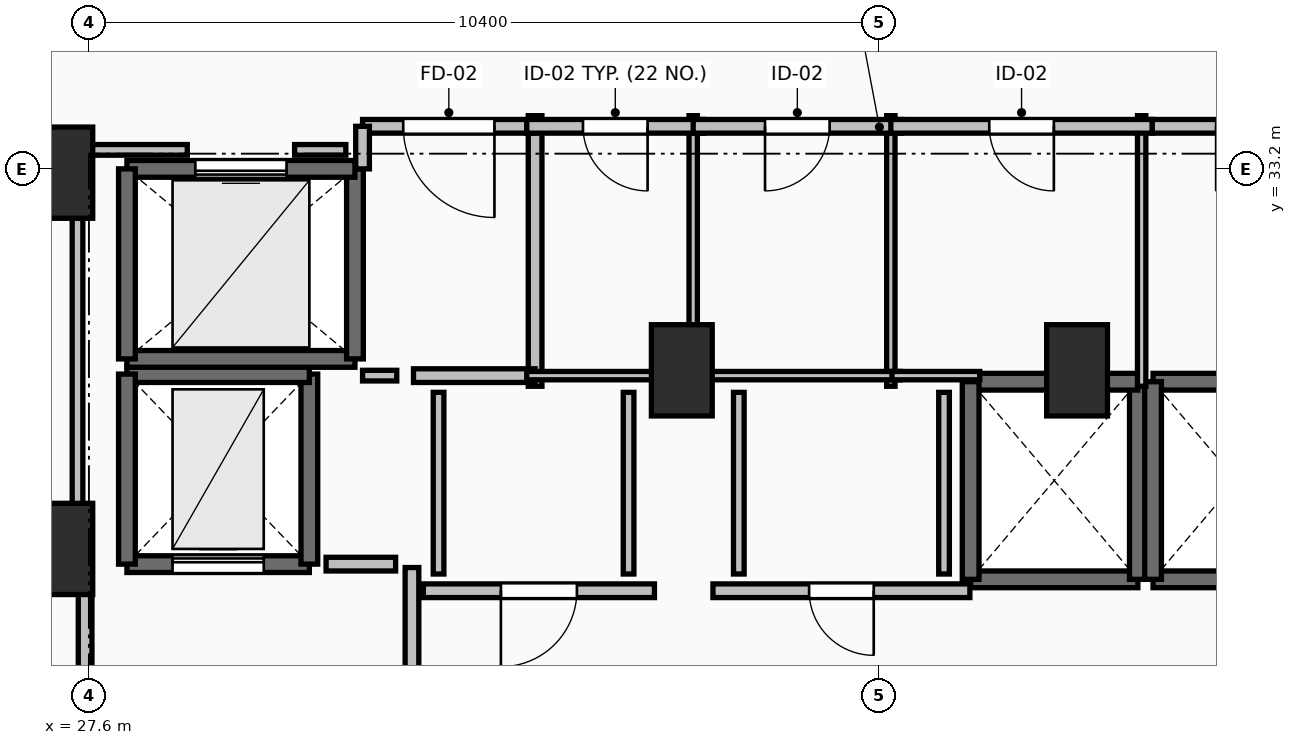
"""IFC4 building model, lengths in metres.
Left out: names, types, materials, properties, quantities, classifications, styles, units other than length and angle.
Written with IfcOpenShell. Run it as: python <this file> out.ifc"""

import sys

from ifc_helpers import new_model, si_unit, direction, frame, frame_2d, origin, origin_2d, place, context, subcontext, project, spatial, rectangle, extrude, element, fill, save


model = new_model("IFC4")
c1 = context("Model", 3, precision=1e-05, world=origin(), true_north=direction((0.0, 1.0)))
c2 = subcontext(c1, "Body", "Model", "MODEL_VIEW")
j1 = project(units=[si_unit("LENGTHUNIT", "METRE"), si_unit("PLANEANGLEUNIT", "RADIAN")], contexts=[c1])
p1 = place(None, origin())
s1 = spatial("IfcSite", under=j1, at=p1, CompositionType="ELEMENT")
p2 = place(p1, origin())
s2 = spatial("IfcBuilding", under=s1, at=p2, CompositionType="ELEMENT")
p3 = place(p2, frame((0.0, 0.0, 160.6)))
s3 = spatial("IfcBuildingStorey", under=s2, at=p3, CompositionType="ELEMENT", Elevation=160.6)
for number, where, z_axis, x_axis in (
    (1, (27.25, 28.2, 0.0), (0.0, 0.0, 1.0), (1.0, 0.0, 0.0)),
    (2, (27.25, 33.15, 0.0), (0.0, 0.0, 1.0), (1.0, 0.0, 0.0)),
    (3, (35.4, 30.55, 0.0), (0.0, 0.0, 1.0), (1.0, 0.0, 0.0)),
    (4, (40.6, 30.55, 0.0), (0.0, 0.0, 1.0), (1.0, 0.0, 0.0)),
):
    element("IfcColumn", number, at=place(p3, frame(where, z_axis=z_axis, x_axis=x_axis)), inside=s3, PredefinedType="PILASTER", context=c2, shape_type="SweptSolid", body=[
        extrude(rectangle(XDim=0.8, YDim=1.2, at=origin_2d()), origin(), (0.0, 0.0, 1.0), 3.5),
    ])
p4 = place(p3, frame((39.2, 27.8, 0.0), z_axis=(0.0, 0.0, 1.0), x_axis=(1.0, 0.0, 0.0)))
e5 = element("IfcWall", 5, at=p4, inside=s3, PredefinedType="SOLIDWALL", context=c2, shape_type="SweptSolid", body=[
    extrude(rectangle(XDim=2.2, YDim=0.22, at=frame_2d((1.1, 0.0))), origin(), (0.0, 0.0, 1.0), 3.24),
])
p5 = place(p3, frame((41.4, 27.8, 0.0), z_axis=(0.0, 0.0, 1.0), x_axis=(0.0, 1.0, 0.0)))
e6 = element("IfcWall", 6, at=p5, inside=s3, PredefinedType="SOLIDWALL", context=c2, shape_type="SweptSolid", body=[
    extrude(rectangle(XDim=2.6, YDim=0.22, at=frame_2d((1.3, 0.0))), origin(), (0.0, 0.0, 1.0), 3.24),
])
p6 = place(p3, frame((41.4, 30.4, 0.0), z_axis=(0.0, 0.0, 1.0), x_axis=(-1.0, 0.0, 0.0)))
e7 = element("IfcWall", 7, at=p6, inside=s3, PredefinedType="SOLIDWALL", context=c2, shape_type="SweptSolid", body=[
    extrude(rectangle(XDim=2.2, YDim=0.22, at=frame_2d((1.1, 0.0))), origin(), (0.0, 0.0, 1.0), 3.24),
])
p7 = place(p3, frame((39.2, 30.4, 0.0), z_axis=(0.0, 0.0, 1.0), x_axis=(0.0, -1.0, 0.0)))
e8 = element("IfcWall", 8, at=p7, inside=s3, PredefinedType="SOLIDWALL", context=c2, shape_type="SweptSolid", body=[
    extrude(rectangle(XDim=2.6, YDim=0.22, at=frame_2d((1.3, 0.0))), origin(), (0.0, 0.0, 1.0), 3.24),
])
for number, where, z_axis, x_axis in (
    (9, (41.6, 27.8, 0.0), (0.0, 0.0, 1.0), (1.0, 0.0, 0.0)),
    (10, (43.8, 30.4, 0.0), (0.0, 0.0, 1.0), (-1.0, 0.0, 0.0)),
):
    element("IfcWall", number, at=place(p3, frame(where, z_axis=z_axis, x_axis=x_axis)), inside=s3, PredefinedType="SOLIDWALL", context=c2, shape_type="SweptSolid", body=[
        extrude(rectangle(XDim=2.2, YDim=0.22, at=frame_2d((1.1, 0.0))), origin(), (0.0, 0.0, 1.0), 3.24),
    ])
p8 = place(p3, frame((41.6, 30.4, 0.0), z_axis=(0.0, 0.0, 1.0), x_axis=(0.0, -1.0, 0.0)))
e11 = element("IfcWall", 11, at=p8, inside=s3, PredefinedType="SOLIDWALL", context=c2, shape_type="SweptSolid", body=[
    extrude(rectangle(XDim=2.6, YDim=0.22, at=frame_2d((1.3, 0.0))), origin(), (0.0, 0.0, 1.0), 3.24),
])
p9 = place(p3, frame((28.1, 28.0, 0.0), z_axis=(0.0, 0.0, 1.0), x_axis=(1.0, 0.0, 0.0)))
e12 = element("IfcWall", 12, at=p9, inside=s3, PredefinedType="SHEAR", context=c2, shape_type="SweptSolid", body=[
    extrude(rectangle(XDim=2.4, YDim=0.22, at=frame_2d((1.2, 0.0))), origin(), (0.0, 0.0, 1.0), 3.24),
])
p10 = place(p9, frame((0.6, 0.0, 0.0)))
e13 = element("IfcOpeningElement", 13, at=p10, cuts=e12, PredefinedType="OPENING", context=c2, shape_type="SweptSolid", body=[
    extrude(rectangle(XDim=1.2, YDim=2.2, at=frame_2d((0.6, 1.1))), frame((0.0, 0.125, 0.0), z_axis=(0.0, -1.0, 0.0), x_axis=(1.0, 0.0, 0.0)), (0.0, 0.0, 1.0), 0.25),
])
p11 = place(p3, frame((30.5, 28.0, 0.0), z_axis=(0.0, 0.0, 1.0), x_axis=(0.0, 1.0, 0.0)))
e14 = element("IfcWall", 14, at=p11, inside=s3, PredefinedType="SHEAR", context=c2, shape_type="SweptSolid", body=[
    extrude(rectangle(XDim=2.5, YDim=0.22, at=frame_2d((1.25, 0.0))), origin(), (0.0, 0.0, 1.0), 3.24),
])
p12 = place(p3, frame((30.5, 30.5, 0.0), z_axis=(0.0, 0.0, 1.0), x_axis=(-1.0, 0.0, 0.0)))
e15 = element("IfcWall", 15, at=p12, inside=s3, PredefinedType="SHEAR", context=c2, shape_type="SweptSolid", body=[
    extrude(rectangle(XDim=2.4, YDim=0.22, at=frame_2d((1.2, 0.0))), origin(), (0.0, 0.0, 1.0), 3.24),
])
p13 = place(p3, frame((28.1, 30.5, 0.0), z_axis=(0.0, 0.0, 1.0), x_axis=(0.0, -1.0, 0.0)))
e16 = element("IfcWall", 16, at=p13, inside=s3, PredefinedType="SHEAR", context=c2, shape_type="SweptSolid", body=[
    extrude(rectangle(XDim=2.5, YDim=0.22, at=frame_2d((1.25, 0.0))), origin(), (0.0, 0.0, 1.0), 3.24),
])
p14 = place(p3, frame((28.1, 30.7, 0.0), z_axis=(0.0, 0.0, 1.0), x_axis=(1.0, 0.0, 0.0)))
e17 = element("IfcWall", 17, at=p14, inside=s3, PredefinedType="SOLIDWALL", context=c2, shape_type="SweptSolid", body=[
    extrude(rectangle(XDim=3.0, YDim=0.22, at=frame_2d((1.5, 0.0))), origin(), (0.0, 0.0, 1.0), 3.24),
])
p15 = place(p3, frame((31.1, 30.7, 0.0), z_axis=(0.0, 0.0, 1.0), x_axis=(0.0, 1.0, 0.0)))
e18 = element("IfcWall", 18, at=p15, inside=s3, PredefinedType="SOLIDWALL", context=c2, shape_type="SweptSolid", body=[
    extrude(rectangle(XDim=2.5, YDim=0.22, at=frame_2d((1.25, 0.0))), origin(), (0.0, 0.0, 1.0), 3.24),
])
p16 = place(p3, frame((31.1, 33.2, 0.0), z_axis=(0.0, 0.0, 1.0), x_axis=(-1.0, 0.0, 0.0)))
e19 = element("IfcWall", 19, at=p16, inside=s3, PredefinedType="SOLIDWALL", context=c2, shape_type="SweptSolid", body=[
    extrude(rectangle(XDim=3.0, YDim=0.22, at=frame_2d((1.5, 0.0))), origin(), (0.0, 0.0, 1.0), 3.24),
])
p17 = place(p16, frame((0.9, 0.0, 0.0)))
e20 = element("IfcOpeningElement", 20, at=p17, cuts=e19, PredefinedType="OPENING", context=c2, shape_type="SweptSolid", body=[
    extrude(rectangle(XDim=1.2, YDim=2.2, at=frame_2d((0.6, 1.1))), frame((0.0, 0.125, 0.0), z_axis=(0.0, -1.0, 0.0), x_axis=(1.0, 0.0, 0.0)), (0.0, 0.0, 1.0), 0.25),
])
p18 = place(p3, frame((28.1, 33.2, 0.0), z_axis=(0.0, 0.0, 1.0), x_axis=(0.0, -1.0, 0.0)))
e21 = element("IfcWall", 21, at=p18, inside=s3, PredefinedType="SOLIDWALL", context=c2, shape_type="SweptSolid", body=[
    extrude(rectangle(XDim=2.5, YDim=0.22, at=frame_2d((1.25, 0.0))), origin(), (0.0, 0.0, 1.0), 3.24),
])
p19 = place(p3, frame((31.85, 24.045, 0.0), z_axis=(0.0, 0.0, 1.0), x_axis=(0.0, 1.0, 0.0)))
e22 = element("IfcWall", 22, at=p19, inside=s3, PredefinedType="PARTITIONING", context=c2, shape_type="SweptSolid", body=[
    extrude(rectangle(XDim=3.91, YDim=0.18, at=frame_2d((1.955, 0.0))), origin(), (0.0, 0.0, 1.0), 3.24),
])
p20 = place(p19, frame((1.355, 0.0, 0.0)))
e23 = element("IfcOpeningElement", 23, at=p20, cuts=e22, PredefinedType="OPENING", context=c2, shape_type="SweptSolid", body=[
    extrude(rectangle(XDim=1.2, YDim=2.15, at=frame_2d((0.6, 1.075))), frame((0.0, 0.105, 0.0), z_axis=(0.0, -1.0, 0.0), x_axis=(1.0, 0.0, 0.0)), (0.0, 0.0, 1.0), 0.21),
])
p21 = place(p3, frame((27.55, 28.0, 0.0), z_axis=(0.0, 0.0, 1.0), x_axis=(0.0, -1.0, 0.0)))
e24 = element("IfcWall", 24, at=p21, inside=s3, PredefinedType="PARTITIONING", context=c2, shape_type="SweptSolid", body=[
    extrude(rectangle(XDim=4.05, YDim=0.18, at=frame_2d((2.025, 0.0))), origin(), (0.0, 0.0, 1.0), 3.24),
])
p22 = place(p21, frame((1.425, 0.0, 0.0)))
e25 = element("IfcOpeningElement", 25, at=p22, cuts=e24, PredefinedType="OPENING", context=c2, shape_type="SweptSolid", body=[
    extrude(rectangle(XDim=1.2, YDim=2.15, at=frame_2d((0.6, 1.075))), frame((0.0, 0.105, 0.0), z_axis=(0.0, -1.0, 0.0), x_axis=(1.0, 0.0, 0.0)), (0.0, 0.0, 1.0), 0.21),
])
p23 = place(p3, frame((33.47, 30.34, 0.0), z_axis=(0.0, 0.0, 1.0), x_axis=(0.0, 1.0, 0.0)))
e26 = element("IfcWall", 26, at=p23, inside=s3, PredefinedType="PARTITIONING", context=c2, shape_type="SweptSolid", body=[
    extrude(rectangle(XDim=3.56, YDim=0.18, at=frame_2d((1.78, 0.0))), origin(), (0.0, 0.0, 1.0), 3.24),
])
p24 = place(p3, frame((31.87, 30.48, 0.0), z_axis=(0.0, 0.0, 1.0), x_axis=(1.0, 0.0, 0.0)))
e27 = element("IfcWall", 27, at=p24, inside=s3, PredefinedType="PARTITIONING", context=c2, shape_type="SweptSolid", body=[
    extrude(rectangle(XDim=1.6, YDim=0.18, at=frame_2d((0.8, 0.0))), origin(), (0.0, 0.0, 1.0), 3.24),
])
p25 = place(p3, frame((33.47, 33.76, 0.0), z_axis=(0.0, 0.0, 1.0), x_axis=(-1.0, 0.0, 0.0)))
e28 = element("IfcWall", 28, at=p25, inside=s3, PredefinedType="PARTITIONING", context=c2, shape_type="SweptSolid", body=[
    extrude(rectangle(XDim=2.27, YDim=0.18, at=frame_2d((1.135, 0.0))), origin(), (0.0, 0.0, 1.0), 3.24),
])
p26 = place(p25, frame((0.535, 0.0, 0.0)))
e29 = element("IfcOpeningElement", 29, at=p26, cuts=e28, PredefinedType="OPENING", context=c2, shape_type="SweptSolid", body=[
    extrude(rectangle(XDim=1.2, YDim=2.15, at=frame_2d((0.6, 1.075))), frame((0.0, 0.105, 0.0), z_axis=(0.0, -1.0, 0.0), x_axis=(1.0, 0.0, 0.0)), (0.0, 0.0, 1.0), 0.21),
])
p27 = place(p3, frame((31.2, 33.76, 0.0), z_axis=(0.0, 0.0, 1.0), x_axis=(0.0, -1.0, 0.0)))
e30 = element("IfcWall", 30, at=p27, inside=s3, PredefinedType="PARTITIONING", context=c2, shape_type="SweptSolid", body=[
    extrude(rectangle(XDim=0.56, YDim=0.18, at=frame_2d((0.28, 0.0))), origin(), (0.0, 0.0, 1.0), 3.24),
])
p28 = place(p3, frame((35.04, 27.65, 0.0), z_axis=(0.0, 0.0, 1.0), x_axis=(-1.0, 0.0, 0.0)))
e31 = element("IfcWall", 31, at=p28, inside=s3, PredefinedType="PARTITIONING", context=c2, shape_type="SweptSolid", body=[
    extrude(rectangle(XDim=3.04, YDim=0.18, at=frame_2d((1.52, 0.0))), origin(), (0.0, 0.0, 1.0), 3.24),
])
p29 = place(p28, frame((1.02, 0.0, 0.0)))
e32 = element("IfcOpeningElement", 32, at=p29, cuts=e31, PredefinedType="OPENING", context=c2, shape_type="SweptSolid", body=[
    extrude(rectangle(XDim=1.0, YDim=2.15, at=frame_2d((0.5, 1.075))), frame((0.0, 0.105, 0.0), z_axis=(0.0, -1.0, 0.0), x_axis=(1.0, 0.0, 0.0)), (0.0, 0.0, 1.0), 0.21),
])
p30 = place(p3, frame((39.19, 27.65, 0.0), z_axis=(0.0, 0.0, 1.0), x_axis=(-1.0, 0.0, 0.0)))
e33 = element("IfcWall", 33, at=p30, inside=s3, PredefinedType="PARTITIONING", context=c2, shape_type="SweptSolid", body=[
    extrude(rectangle(XDim=3.38, YDim=0.18, at=frame_2d((1.69, 0.0))), origin(), (0.0, 0.0, 1.0), 3.24),
])
p31 = place(p30, frame((1.265, 0.0, 0.0)))
e34 = element("IfcOpeningElement", 34, at=p31, cuts=e33, PredefinedType="OPENING", context=c2, shape_type="SweptSolid", body=[
    extrude(rectangle(XDim=0.85, YDim=2.1, at=frame_2d((0.425, 1.05))), frame((0.0, 0.105, 0.0), z_axis=(0.0, -1.0, 0.0), x_axis=(1.0, 0.0, 0.0)), (0.0, 0.0, 1.0), 0.21),
])
p32 = place(p3, frame((35.55, 30.34, 0.0), z_axis=(0.0, 0.0, 1.0), x_axis=(0.0, 1.0, 0.0)))
e35 = element("IfcWall", 35, at=p32, inside=s3, PredefinedType="PARTITIONING", context=c2, shape_type="SweptSolid", body=[
    extrude(rectangle(XDim=3.56, YDim=0.11, at=frame_2d((1.78, 0.0))), origin(), (0.0, 0.0, 1.0), 2.432),
])
p33 = place(p3, frame((33.36, 30.48, 0.0), z_axis=(0.0, 0.0, 1.0), x_axis=(1.0, 0.0, 0.0)))
e36 = element("IfcWall", 36, at=p33, inside=s3, PredefinedType="PARTITIONING", context=c2, shape_type="SweptSolid", body=[
    extrude(rectangle(XDim=1.81, YDim=0.11, at=frame_2d((0.905, 0.0))), origin(), (0.0, 0.0, 1.0), 3.24),
])
p34 = place(p3, frame((35.69, 33.76, 0.0), z_axis=(0.0, 0.0, 1.0), x_axis=(-1.0, 0.0, 0.0)))
e37 = element("IfcWall", 37, at=p34, inside=s3, PredefinedType="PARTITIONING", context=c2, shape_type="SweptSolid", body=[
    extrude(rectangle(XDim=2.33, YDim=0.18, at=frame_2d((1.165, 0.0))), origin(), (0.0, 0.0, 1.0), 3.24),
])
p35 = place(p34, frame((0.74, 0.0, 0.0)))
e38 = element("IfcOpeningElement", 38, at=p35, cuts=e37, PredefinedType="OPENING", context=c2, shape_type="SweptSolid", body=[
    extrude(rectangle(XDim=0.85, YDim=2.1, at=frame_2d((0.425, 1.05))), frame((0.0, 0.105, 0.0), z_axis=(0.0, -1.0, 0.0), x_axis=(1.0, 0.0, 0.0)), (0.0, 0.0, 1.0), 0.21),
])
p36 = place(p3, frame((38.15, 30.34, 0.0), z_axis=(0.0, 0.0, 1.0), x_axis=(0.0, 1.0, 0.0)))
e39 = element("IfcWall", 39, at=p36, inside=s3, PredefinedType="PARTITIONING", context=c2, shape_type="SweptSolid", body=[
    extrude(rectangle(XDim=3.56, YDim=0.11, at=frame_2d((1.78, 0.0))), origin(), (0.0, 0.0, 1.0), 2.432),
])
p37 = place(p3, frame((35.68, 30.48, 0.0), z_axis=(0.0, 0.0, 1.0), x_axis=(1.0, 0.0, 0.0)))
e40 = element("IfcWall", 40, at=p37, inside=s3, PredefinedType="PARTITIONING", context=c2, shape_type="SweptSolid", body=[
    extrude(rectangle(XDim=2.595, YDim=0.11, at=frame_2d((1.297, 0.0))), origin(), (0.0, 0.0, 1.0), 2.432),
])
p38 = place(p3, frame((38.29, 33.76, 0.0), z_axis=(0.0, 0.0, 1.0), x_axis=(-1.0, 0.0, 0.0)))
e41 = element("IfcWall", 41, at=p38, inside=s3, PredefinedType="PARTITIONING", context=c2, shape_type="SweptSolid", body=[
    extrude(rectangle(XDim=2.74, YDim=0.18, at=frame_2d((1.37, 0.0))), origin(), (0.0, 0.0, 1.0), 3.24),
])
p39 = place(p38, frame((0.945, 0.0, 0.0)))
e42 = element("IfcOpeningElement", 42, at=p39, cuts=e41, PredefinedType="OPENING", context=c2, shape_type="SweptSolid", body=[
    extrude(rectangle(XDim=0.85, YDim=2.1, at=frame_2d((0.425, 1.05))), frame((0.0, 0.105, 0.0), z_axis=(0.0, -1.0, 0.0), x_axis=(1.0, 0.0, 0.0)), (0.0, 0.0, 1.0), 0.21),
])
p40 = place(p3, frame((41.45, 30.34, 0.0), z_axis=(0.0, 0.0, 1.0), x_axis=(0.0, 1.0, 0.0)))
e43 = element("IfcWall", 43, at=p40, inside=s3, PredefinedType="PARTITIONING", context=c2, shape_type="SweptSolid", body=[
    extrude(rectangle(XDim=3.56, YDim=0.11, at=frame_2d((1.78, 0.0))), origin(), (0.0, 0.0, 1.0), 3.24),
])
p41 = place(p3, frame((38.165, 30.48, 0.0), z_axis=(0.0, 0.0, 1.0), x_axis=(1.0, 0.0, 0.0)))
e44 = element("IfcWall", 44, at=p41, inside=s3, PredefinedType="PARTITIONING", context=c2, shape_type="SweptSolid", body=[
    extrude(rectangle(XDim=1.155, YDim=0.11, at=frame_2d((0.578, 0.0))), origin(), (0.0, 0.0, 1.0), 2.432),
])
p42 = place(p3, frame((41.59, 33.76, 0.0), z_axis=(0.0, 0.0, 1.0), x_axis=(-1.0, 0.0, 0.0)))
e45 = element("IfcWall", 45, at=p42, inside=s3, PredefinedType="PARTITIONING", context=c2, shape_type="SweptSolid", body=[
    extrude(rectangle(XDim=3.44, YDim=0.18, at=frame_2d((1.72, 0.0))), origin(), (0.0, 0.0, 1.0), 3.24),
])
p43 = place(p42, frame((1.295, 0.0, 0.0)))
e46 = element("IfcOpeningElement", 46, at=p43, cuts=e45, PredefinedType="OPENING", context=c2, shape_type="SweptSolid", body=[
    extrude(rectangle(XDim=0.85, YDim=2.1, at=frame_2d((0.425, 1.05))), frame((0.0, 0.105, 0.0), z_axis=(0.0, -1.0, 0.0), x_axis=(1.0, 0.0, 0.0)), (0.0, 0.0, 1.0), 0.21),
])
p44 = place(p3, frame((44.12, 33.76, 0.0), z_axis=(0.0, 0.0, 1.0), x_axis=(-1.0, 0.0, 0.0)))
e47 = element("IfcWall", 47, at=p44, inside=s3, PredefinedType="PARTITIONING", context=c2, shape_type="SweptSolid", body=[
    extrude(rectangle(XDim=2.53, YDim=0.18, at=frame_2d((1.265, 0.0))), origin(), (0.0, 0.0, 1.0), 3.24),
])
p45 = place(p44, frame((0.84, 0.0, 0.0)))
e48 = element("IfcOpeningElement", 48, at=p45, cuts=e47, PredefinedType="OPENING", context=c2, shape_type="SweptSolid", body=[
    extrude(rectangle(XDim=0.85, YDim=2.1, at=frame_2d((0.425, 1.05))), frame((0.0, 0.105, 0.0), z_axis=(0.0, -1.0, 0.0), x_axis=(1.0, 0.0, 0.0)), (0.0, 0.0, 1.0), 0.21),
])
p46 = place(p3, frame((31.635, 28.0, 0.0), z_axis=(0.0, 0.0, 1.0), x_axis=(-1.0, 0.0, 0.0)))
e49 = element("IfcWall", 49, at=p46, inside=s3, PredefinedType="PARTITIONING", context=c2, shape_type="SweptSolid", body=[
    extrude(rectangle(XDim=0.915, YDim=0.18, at=frame_2d((0.458, 0.0))), origin(), (0.0, 0.0, 1.0), 3.24),
])
p47 = place(p3, frame((31.2, 30.48, 0.0), z_axis=(0.0, 0.0, 1.0), x_axis=(1.0, 0.0, 0.0)))
e50 = element("IfcWall", 50, at=p47, inside=s3, PredefinedType="PARTITIONING", context=c2, shape_type="SweptSolid", body=[
    extrude(rectangle(XDim=0.45, YDim=0.14, at=frame_2d((0.225, 0.0))), origin(), (0.0, 0.0, 1.0), 3.24),
])
for number, where, z_axis, x_axis in (
    (51, (32.2, 30.26, 0.0), (0.0, 0.0, 1.0), (0.0, -1.0, 0.0)),
    (52, (34.7, 27.87, 0.0), (0.0, 0.0, 1.0), (0.0, 1.0, 0.0)),
    (53, (36.15, 30.26, 0.0), (0.0, 0.0, 1.0), (0.0, -1.0, 0.0)),
    (54, (38.85, 27.87, 0.0), (0.0, 0.0, 1.0), (0.0, 1.0, 0.0)),
):
    element("IfcWall", number, at=place(p3, frame(where, z_axis=z_axis, x_axis=x_axis)), inside=s3, PredefinedType="PARTITIONING", context=c2, shape_type="SweptSolid", body=[
        extrude(rectangle(XDim=2.39, YDim=0.14, at=frame_2d((1.195, 0.0))), origin(), (0.0, 0.0, 1.0), 3.24),
    ])
p48 = place(p3, frame((30.98, 33.45, 0.0), z_axis=(0.0, 0.0, 1.0), x_axis=(-1.0, 0.0, 0.0)))
e55 = element("IfcWall", 55, at=p48, inside=s3, PredefinedType="PARTITIONING", context=c2, shape_type="SweptSolid", body=[
    extrude(rectangle(XDim=0.674, YDim=0.14, at=frame_2d((0.337, 0.0))), origin(), (0.0, 0.0, 1.0), 3.24),
])
p49 = place(p3, frame((28.894, 33.45, 0.0), z_axis=(0.0, 0.0, 1.0), x_axis=(-1.0, 0.0, 0.0)))
e56 = element("IfcWall", 56, at=p49, inside=s3, PredefinedType="PARTITIONING", context=c2, shape_type="SweptSolid", body=[
    extrude(rectangle(XDim=1.444, YDim=0.14, at=frame_2d((0.722, 0.0))), origin(), (0.0, 0.0, 1.0), 2.432),
])
p50 = place(p3, frame((27.45, 33.45, 0.0), z_axis=(0.0, 0.0, 1.0), x_axis=(0.0, -1.0, 0.0)))
e57 = element("IfcWall", 57, at=p50, inside=s3, PredefinedType="PARTITIONING", context=c2, shape_type="SweptSolid", body=[
    extrude(rectangle(XDim=5.254, YDim=0.14, at=frame_2d((2.627, 0.0))), origin(), (0.0, 0.0, 1.0), 2.432),
])
p51 = place(p10, origin())
e58 = element("IfcDoor", 58, at=p51, inside=s3, OperationType="SLIDING_TO_LEFT", PredefinedType="DOOR", context=c2, shape_type="SweptSolid", body=[
    extrude(rectangle(XDim=1.2, YDim=2.2, at=frame_2d((0.6, 1.1))), frame((0.0, 0.025, 0.0), z_axis=(0.0, -1.0, 0.0), x_axis=(1.0, 0.0, 0.0)), (0.0, 0.0, 1.0), 0.05),
])
fill(e13, e58)
p52 = place(p17, origin())
e59 = element("IfcDoor", 59, at=p52, inside=s3, OperationType="SLIDING_TO_LEFT", PredefinedType="DOOR", context=c2, shape_type="SweptSolid", body=[
    extrude(rectangle(XDim=1.2, YDim=2.2, at=frame_2d((0.6, 1.1))), frame((0.0, 0.025, 0.0), z_axis=(0.0, -1.0, 0.0), x_axis=(1.0, 0.0, 0.0)), (0.0, 0.0, 1.0), 0.05),
])
fill(e20, e59)
p53 = place(p26, origin())
e60 = element("IfcDoor", 60, at=p53, inside=s3, OperationType="SINGLE_SWING_LEFT", PredefinedType="DOOR", context=c2, shape_type="SweptSolid", body=[
    extrude(rectangle(XDim=1.2, YDim=2.15, at=frame_2d((0.6, 1.075))), frame((0.0, 0.025, 0.0), z_axis=(0.0, -1.0, 0.0), x_axis=(1.0, 0.0, 0.0)), (0.0, 0.0, 1.0), 0.05),
])
fill(e29, e60)
p54 = place(p29, origin())
e61 = element("IfcDoor", 61, at=p54, inside=s3, OperationType="SINGLE_SWING_RIGHT", PredefinedType="DOOR", context=c2, shape_type="SweptSolid", body=[
    extrude(rectangle(XDim=1.0, YDim=2.15, at=frame_2d((0.5, 1.075))), frame((0.0, 0.025, 0.0), z_axis=(0.0, -1.0, 0.0), x_axis=(1.0, 0.0, 0.0)), (0.0, 0.0, 1.0), 0.05),
])
fill(e32, e61)
p55 = place(p31, origin())
e62 = element("IfcDoor", 62, at=p55, inside=s3, OperationType="SINGLE_SWING_LEFT", PredefinedType="DOOR", context=c2, shape_type="SweptSolid", body=[
    extrude(rectangle(XDim=0.85, YDim=2.1, at=frame_2d((0.425, 1.05))), frame((0.0, 0.025, 0.0), z_axis=(0.0, -1.0, 0.0), x_axis=(1.0, 0.0, 0.0)), (0.0, 0.0, 1.0), 0.05),
])
fill(e34, e62)
p56 = place(p35, origin())
e63 = element("IfcDoor", 63, at=p56, inside=s3, OperationType="SINGLE_SWING_LEFT", PredefinedType="DOOR", context=c2, shape_type="SweptSolid", body=[
    extrude(rectangle(XDim=0.85, YDim=2.1, at=frame_2d((0.425, 1.05))), frame((0.0, 0.025, 0.0), z_axis=(0.0, -1.0, 0.0), x_axis=(1.0, 0.0, 0.0)), (0.0, 0.0, 1.0), 0.05),
])
fill(e38, e63)
p57 = place(p39, origin())
e64 = element("IfcDoor", 64, at=p57, inside=s3, OperationType="SINGLE_SWING_RIGHT", PredefinedType="DOOR", context=c2, shape_type="SweptSolid", body=[
    extrude(rectangle(XDim=0.85, YDim=2.1, at=frame_2d((0.425, 1.05))), frame((0.0, 0.025, 0.0), z_axis=(0.0, -1.0, 0.0), x_axis=(1.0, 0.0, 0.0)), (0.0, 0.0, 1.0), 0.05),
])
fill(e42, e64)
p58 = place(p43, origin())
e65 = element("IfcDoor", 65, at=p58, inside=s3, OperationType="SINGLE_SWING_LEFT", PredefinedType="DOOR", context=c2, shape_type="SweptSolid", body=[
    extrude(rectangle(XDim=0.85, YDim=2.1, at=frame_2d((0.425, 1.05))), frame((0.0, 0.025, 0.0), z_axis=(0.0, -1.0, 0.0), x_axis=(1.0, 0.0, 0.0)), (0.0, 0.0, 1.0), 0.05),
])
fill(e46, e65)
save(model, sys.argv[1])
